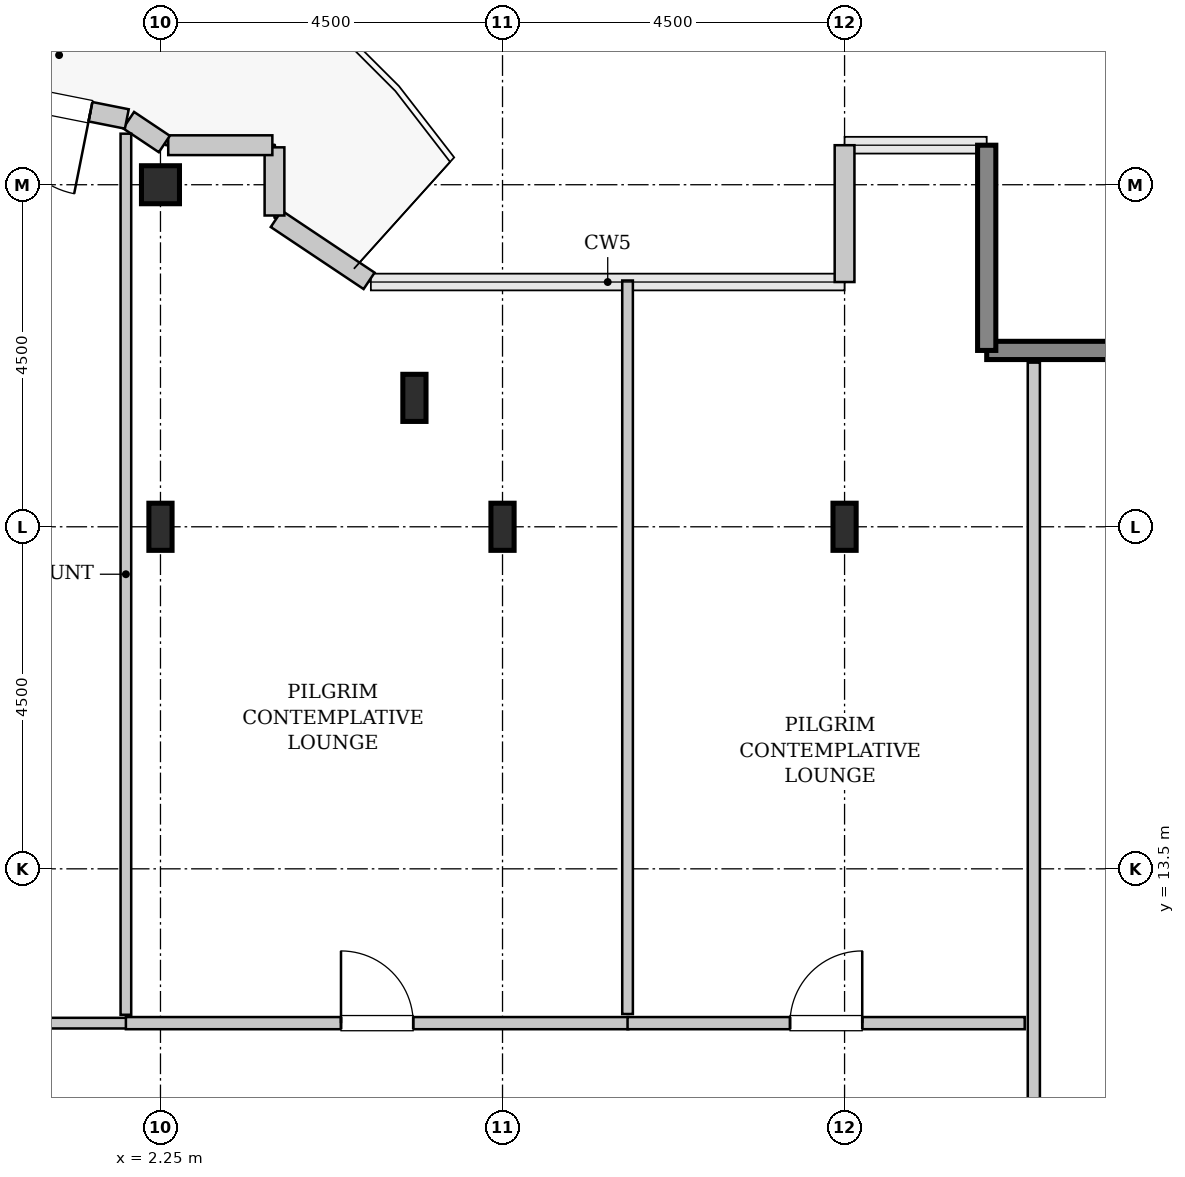
"""IFC4 building model, lengths in metres.
Left out: names, types, materials, properties, quantities, classifications, styles, units other than length and angle.
Written with IfcOpenShell. Run it as: python <this file> out.ifc"""

import sys

from ifc_helpers import new_model, si_unit, direction, frame, frame_2d, origin, origin_2d, place, context, subcontext, project, spatial, rectangle, hollow_rectangle, i_section, extrude, source, transform, mapped, element, fill, save


model = new_model("IFC4")
c1 = context("Model", 3, precision=1e-05, world=origin(), true_north=direction((0.0, 1.0)))
c2 = subcontext(c1, "Body", "Model", "MODEL_VIEW")
j1 = project(units=[si_unit("LENGTHUNIT", "METRE"), si_unit("PLANEANGLEUNIT", "RADIAN")], contexts=[c1])
p1 = place(None, origin())
s1 = spatial("IfcSite", under=j1, at=p1, CompositionType="ELEMENT")
p2 = place(p1, origin())
s2 = spatial("IfcBuilding", under=s1, at=p2, CompositionType="ELEMENT")
p3 = place(p2, frame((0.0, 0.0, 298.8)))
s3 = spatial("IfcBuildingStorey", under=s2, at=p3, CompositionType="ELEMENT", Elevation=298.8)
m1 = source(origin(), c2, "Body", "SweptSolid", [
    extrude(i_section(OverallWidth=0.305, OverallDepth=0.62, WebThickness=0.021, FlangeThickness=0.04, FilletRadius=0.027, at=origin_2d()), origin(), (0.0, 0.0, 1.0), 3.8),
])
p4 = place(p3, frame((2.25, 18.0, 0.0), z_axis=(0.0, 0.0, 1.0), x_axis=(1.0, 0.0, 0.0)))
e1 = element("IfcColumn", 1, at=p4, inside=s3, PredefinedType="COLUMN", context=c2, shape_type="MappedRepresentation", body=[
    mapped(m1, transform((0.0, 0.0, 0.0), x_axis=(1.0, 0.0, 0.0), y_axis=(0.0, 1.0, 0.0), z_axis=(0.0, 0.0, 1.0), scale=1.0)),
])
m2 = source(origin(), c2, "Body", "SweptSolid", [
    extrude(hollow_rectangle(XDim=0.5, YDim=0.5, WallThickness=0.025, InnerFilletRadius=0.025, OuterFilletRadius=0.05, at=origin_2d()), origin(), (0.0, 0.0, 1.0), 3.8),
])
p5 = place(p3, frame((2.25, 22.5, 0.0), z_axis=(0.0, 0.0, 1.0), x_axis=(1.0, 0.0, 0.0)))
e2 = element("IfcColumn", 2, at=p5, inside=s3, PredefinedType="COLUMN", context=c2, shape_type="MappedRepresentation", body=[
    mapped(m2, transform((0.0, 0.0, 0.0), x_axis=(1.0, 0.0, 0.0), y_axis=(0.0, 1.0, 0.0), z_axis=(0.0, 0.0, 1.0), scale=1.0)),
])
for number, where, z_axis, x_axis in (
    (3, (5.591, 19.696, 0.0), (0.0, 0.0, 1.0), (1.0, 0.0, 0.0)),
    (4, (6.75, 18.0, 0.0), (0.0, 0.0, 1.0), (1.0, 0.0, 0.0)),
    (5, (11.25, 18.0, 0.0), (0.0, 0.0, 1.0), (1.0, 0.0, 0.0)),
):
    element("IfcColumn", number, at=place(p3, frame(where, z_axis=z_axis, x_axis=x_axis)), inside=s3, PredefinedType="COLUMN", context=c2, shape_type="MappedRepresentation", body=[
        mapped(m1, transform((0.0, 0.0, 0.0), x_axis=(1.0, 0.0, 0.0), y_axis=(0.0, 1.0, 0.0), z_axis=(0.0, 0.0, 1.0), scale=1.0)),
    ])
m3 = source(origin(), c2, "Body", "SweptSolid", [
    extrude(rectangle(XDim=2.7, YDim=0.24, at=frame_2d((1.35, 0.0))), origin(), (0.0, 0.0, 1.0), 3.55),
])
for number, where, z_axis, x_axis in (
    (6, (15.82, 20.32, 0.0), (0.0, 0.0, 1.0), (-1.0, 0.0, 0.0)),
    (7, (13.12, 20.32, 0.0), (0.0, 0.0, 1.0), (0.0, 1.0, 0.0)),
):
    element("IfcWall", number, at=place(p3, frame(where, z_axis=z_axis, x_axis=x_axis)), inside=s3, PredefinedType="SHEAR", context=c2, shape_type="MappedRepresentation", body=[
        mapped(m3, transform((0.0, 0.0, 0.0), x_axis=(1.0, 0.0, 0.0), y_axis=(0.0, 1.0, 0.0), z_axis=(0.0, 0.0, 1.0), scale=1.0)),
    ])
m4 = source(origin(), c2, "Body", "SweptSolid", [
    extrude(rectangle(XDim=1.8, YDim=0.26, at=frame_2d((0.9, 0.0))), origin(), (0.0, 0.0, 1.0), 3.55),
])
p6 = place(p3, frame((11.25, 23.02, 0.0), z_axis=(0.0, 0.0, 1.0), x_axis=(0.0, -1.0, 0.0)))
e8 = element("IfcWall", 8, at=p6, inside=s3, PredefinedType="SOLIDWALL", context=c2, shape_type="MappedRepresentation", body=[
    mapped(m4, transform((0.0, 0.0, 0.0), x_axis=(1.0, 0.0, 0.0), y_axis=(0.0, 1.0, 0.0), z_axis=(0.0, 0.0, 1.0), scale=1.0)),
])
m5 = source(origin(), c2, "Body", "SweptSolid", [
    extrude(rectangle(XDim=1.469, YDim=0.26, at=frame_2d((0.734, 0.0))), origin(), (0.0, 0.0, 1.0), 3.55),
])
p7 = place(p3, frame((4.995, 21.236, 0.0), z_axis=(0.0, 0.0, 1.0), x_axis=(-0.831461760506, 0.555581983884, 0.0)))
e9 = element("IfcWall", 9, at=p7, inside=s3, PredefinedType="SOLIDWALL", context=c2, shape_type="MappedRepresentation", body=[
    mapped(m5, transform((0.0, 0.0, 0.0), x_axis=(1.0, 0.0, 0.0), y_axis=(0.0, 1.0, 0.0), z_axis=(0.0, 0.0, 1.0), scale=1.0)),
])
m6 = source(origin(), c2, "Body", "SweptSolid", [
    extrude(rectangle(XDim=0.897, YDim=0.26, at=frame_2d((0.448, 0.0))), origin(), (0.0, 0.0, 1.0), 3.55),
])
p8 = place(p3, frame((3.75, 22.095, 0.0), z_axis=(0.0, 0.0, 1.0), x_axis=(0.0, 1.0, 0.0)))
e10 = element("IfcWall", 10, at=p8, inside=s3, PredefinedType="SOLIDWALL", context=c2, shape_type="MappedRepresentation", body=[
    mapped(m6, transform((0.0, 0.0, 0.0), x_axis=(1.0, 0.0, 0.0), y_axis=(0.0, 1.0, 0.0), z_axis=(0.0, 0.0, 1.0), scale=1.0)),
])
m7 = source(origin(), c2, "Body", "SweptSolid", [
    extrude(rectangle(XDim=1.37, YDim=0.26, at=frame_2d((0.685, 0.0))), origin(), (0.0, 0.0, 1.0), 3.55),
])
p9 = place(p3, frame((3.722, 23.02, 0.0), z_axis=(0.0, 0.0, 1.0), x_axis=(-1.0, 0.0, 0.0)))
e11 = element("IfcWall", 11, at=p9, inside=s3, PredefinedType="SOLIDWALL", context=c2, shape_type="MappedRepresentation", body=[
    mapped(m7, transform((0.0, 0.0, 0.0), x_axis=(1.0, 0.0, 0.0), y_axis=(0.0, 1.0, 0.0), z_axis=(0.0, 0.0, 1.0), scale=1.0)),
])
m8 = source(origin(), c2, "Body", "SweptSolid", [
    extrude(rectangle(XDim=0.565, YDim=0.26, at=frame_2d((0.283, 0.0))), origin(), (0.0, 0.0, 1.0), 3.55),
])
p10 = place(p3, frame((2.301, 23.036, 0.0), z_axis=(0.0, 0.0, 1.0), x_axis=(-0.831651492666, 0.555297933317, 0.0)))
e12 = element("IfcWall", 12, at=p10, inside=s3, PredefinedType="SOLIDWALL", context=c2, shape_type="MappedRepresentation", body=[
    mapped(m8, transform((0.0, 0.0, 0.0), x_axis=(1.0, 0.0, 0.0), y_axis=(0.0, 1.0, 0.0), z_axis=(0.0, 0.0, 1.0), scale=1.0)),
])
m9 = source(origin(), c2, "Body", "SweptSolid", [
    extrude(rectangle(XDim=4.137, YDim=0.26, at=frame_2d((2.068, 0.0))), origin(), (0.0, 0.0, 1.0), 3.55),
])
p11 = place(p3, frame((1.807, 23.365, 0.0), z_axis=(0.0, 0.0, 1.0), x_axis=(-0.980782170794, 0.195105954428, 0.0)))
e13 = element("IfcWall", 13, at=p11, inside=s3, PredefinedType="SOLIDWALL", context=c2, shape_type="MappedRepresentation", body=[
    mapped(m9, transform((0.0, 0.0, 0.0), x_axis=(1.0, 0.0, 0.0), y_axis=(0.0, 1.0, 0.0), z_axis=(0.0, 0.0, 1.0), scale=1.0)),
])
p12 = place(p11, frame((0.488, 0.0, 0.0)))
e14 = element("IfcOpeningElement", 14, at=p12, cuts=e13, PredefinedType="OPENING", context=c2, shape_type="SweptSolid", body=[
    extrude(rectangle(XDim=1.1, YDim=2.2, at=frame_2d((0.55, 1.1))), frame((0.0, 0.14, 0.0), z_axis=(0.0, -1.0, 0.0), x_axis=(1.0, 0.0, 0.0)), (0.0, 0.0, 1.0), 0.28),
])
m10 = source(origin(), c2, "Body", "SweptSolid", [
    extrude(rectangle(XDim=12.922, YDim=0.16, at=frame_2d((6.461, 0.0))), origin(), (0.0, 0.0, 1.0), 3.535),
])
p13 = place(p3, frame((13.74, 7.238, 0.0), z_axis=(0.0, 0.0, 1.0), x_axis=(0.0, 1.0, 0.0)))
e15 = element("IfcWall", 15, at=p13, inside=s3, PredefinedType="PARTITIONING", context=c2, shape_type="MappedRepresentation", body=[
    mapped(m10, transform((0.0, 0.0, 0.0), x_axis=(1.0, 0.0, 0.0), y_axis=(0.0, 1.0, 0.0), z_axis=(0.0, 0.0, 1.0), scale=1.0)),
])
p14 = place(p13, frame((1.661, 0.0, 0.0)))
e16 = element("IfcOpeningElement", 16, at=p14, cuts=e15, PredefinedType="OPENING", context=c2, shape_type="SweptSolid", body=[
    extrude(rectangle(XDim=0.95, YDim=2.1, at=frame_2d((0.475, 1.05))), frame((0.0, 0.09, 0.0), z_axis=(0.0, -1.0, 0.0), x_axis=(1.0, 0.0, 0.0)), (0.0, 0.0, 1.0), 0.18),
])
m11 = source(origin(), c2, "Body", "SweptSolid", [
    extrude(rectangle(XDim=4.625, YDim=0.14, at=frame_2d((2.312, 0.0))), origin(), (0.0, 0.0, 1.0), 3.535),
])
p15 = place(p3, frame((-2.82, 11.47, 0.0), z_axis=(0.0, 0.0, 1.0), x_axis=(1.0, 0.0, 0.0)))
e17 = element("IfcWall", 17, at=p15, inside=s3, PredefinedType="PARTITIONING", context=c2, shape_type="MappedRepresentation", body=[
    mapped(m11, transform((0.0, 0.0, 0.0), x_axis=(1.0, 0.0, 0.0), y_axis=(0.0, 1.0, 0.0), z_axis=(0.0, 0.0, 1.0), scale=1.0)),
])
m12 = source(origin(), c2, "Body", "SweptSolid", [
    extrude(rectangle(XDim=11.591, YDim=0.14, at=frame_2d((5.796, 0.0))), origin(), (0.0, 0.0, 1.0), 2.925),
])
p16 = place(p3, frame((1.795, 11.58, 0.0), z_axis=(0.0, 0.0, 1.0), x_axis=(0.0, 1.0, 0.0)))
e18 = element("IfcWall", 18, at=p16, inside=s3, PredefinedType="PARTITIONING", context=c2, shape_type="MappedRepresentation", body=[
    mapped(m12, transform((0.0, 0.0, 0.0), x_axis=(1.0, 0.0, 0.0), y_axis=(0.0, 1.0, 0.0), z_axis=(0.0, 0.0, 1.0), scale=1.0)),
])
m13 = source(origin(), c2, "Body", "SweptSolid", [
    extrude(rectangle(XDim=6.61, YDim=0.16, at=frame_2d((3.305, 0.0))), origin(), (0.0, 0.0, 1.0), 3.535),
])
p17 = place(p3, frame((1.795, 11.47, 0.0), z_axis=(0.0, 0.0, 1.0), x_axis=(1.0, 0.0, 0.0)))
e19 = element("IfcWall", 19, at=p17, inside=s3, PredefinedType="PARTITIONING", context=c2, shape_type="MappedRepresentation", body=[
    mapped(m13, transform((0.0, 0.0, 0.0), x_axis=(1.0, 0.0, 0.0), y_axis=(0.0, 1.0, 0.0), z_axis=(0.0, 0.0, 1.0), scale=1.0)),
])
p18 = place(p17, frame((2.83, 0.0, 0.0)))
e20 = element("IfcOpeningElement", 20, at=p18, cuts=e19, PredefinedType="OPENING", context=c2, shape_type="SweptSolid", body=[
    extrude(rectangle(XDim=0.95, YDim=2.1, at=frame_2d((0.475, 1.05))), frame((0.0, 0.09, 0.0), z_axis=(0.0, -1.0, 0.0), x_axis=(1.0, 0.0, 0.0)), (0.0, 0.0, 1.0), 0.18),
])
m14 = source(origin(), c2, "Body", "SweptSolid", [
    extrude(rectangle(XDim=9.65, YDim=0.14, at=frame_2d((4.825, 0.0))), origin(), (0.0, 0.0, 1.0), 3.535),
])
p19 = place(p3, frame((8.395, 11.59, 0.0), z_axis=(0.0, 0.0, 1.0), x_axis=(0.0, 1.0, 0.0)))
e21 = element("IfcWall", 21, at=p19, inside=s3, PredefinedType="PARTITIONING", context=c2, shape_type="MappedRepresentation", body=[
    mapped(m14, transform((0.0, 0.0, 0.0), x_axis=(1.0, 0.0, 0.0), y_axis=(0.0, 1.0, 0.0), z_axis=(0.0, 0.0, 1.0), scale=1.0)),
])
m15 = source(origin(), c2, "Body", "SweptSolid", [
    extrude(rectangle(XDim=5.225, YDim=0.16, at=frame_2d((2.613, 0.0))), origin(), (0.0, 0.0, 1.0), 3.535),
])
p20 = place(p3, frame((8.395, 11.47, 0.0), z_axis=(0.0, 0.0, 1.0), x_axis=(1.0, 0.0, 0.0)))
e22 = element("IfcWall", 22, at=p20, inside=s3, PredefinedType="PARTITIONING", context=c2, shape_type="MappedRepresentation", body=[
    mapped(m15, transform((0.0, 0.0, 0.0), x_axis=(1.0, 0.0, 0.0), y_axis=(0.0, 1.0, 0.0), z_axis=(0.0, 0.0, 1.0), scale=1.0)),
])
p21 = place(p20, frame((2.137, 0.0, 0.0)))
e23 = element("IfcOpeningElement", 23, at=p21, cuts=e22, PredefinedType="OPENING", context=c2, shape_type="SweptSolid", body=[
    extrude(rectangle(XDim=0.95, YDim=2.1, at=frame_2d((0.475, 1.05))), frame((0.0, 0.09, 0.0), z_axis=(0.0, -1.0, 0.0), x_axis=(1.0, 0.0, 0.0)), (0.0, 0.0, 1.0), 0.18),
])
m16 = source(origin(), c2, "Body", "SweptSolid", [
    extrude(rectangle(XDim=1.1, YDim=2.2, at=frame_2d((0.55, 1.1))), frame((0.0, 0.025, 0.0), z_axis=(0.0, -1.0, 0.0), x_axis=(1.0, 0.0, 0.0)), (0.0, 0.0, 1.0), 0.05),
])
p22 = place(p12, origin())
e24 = element("IfcDoor", 24, at=p22, inside=s3, OperationType="SINGLE_SWING_LEFT", PredefinedType="DOOR", context=c2, shape_type="MappedRepresentation", body=[
    mapped(m16, transform((0.0, 0.0, 0.0), x_axis=(1.0, 0.0, 0.0), y_axis=(0.0, 1.0, 0.0), z_axis=(0.0, 0.0, 1.0), scale=1.0)),
])
fill(e14, e24)
m17 = source(origin(), c2, "Body", "SweptSolid", [
    extrude(rectangle(XDim=0.95, YDim=2.1, at=frame_2d((0.475, 1.05))), frame((0.0, 0.025, 0.0), z_axis=(0.0, -1.0, 0.0), x_axis=(1.0, 0.0, 0.0)), (0.0, 0.0, 1.0), 0.05),
])
p23 = place(p18, origin())
e25 = element("IfcDoor", 25, at=p23, inside=s3, OperationType="SINGLE_SWING_LEFT", PredefinedType="DOOR", context=c2, shape_type="MappedRepresentation", body=[
    mapped(m17, transform((0.0, 0.0, 0.0), x_axis=(1.0, 0.0, 0.0), y_axis=(0.0, 1.0, 0.0), z_axis=(0.0, 0.0, 1.0), scale=1.0)),
])
fill(e20, e25)
p24 = place(p21, origin())
e26 = element("IfcDoor", 26, at=p24, inside=s3, OperationType="SINGLE_SWING_RIGHT", PredefinedType="DOOR", context=c2, shape_type="MappedRepresentation", body=[
    mapped(m17, transform((0.0, 0.0, 0.0), x_axis=(1.0, 0.0, 0.0), y_axis=(0.0, 1.0, 0.0), z_axis=(0.0, 0.0, 1.0), scale=1.0)),
])
fill(e23, e26)
save(model, sys.argv[1])
